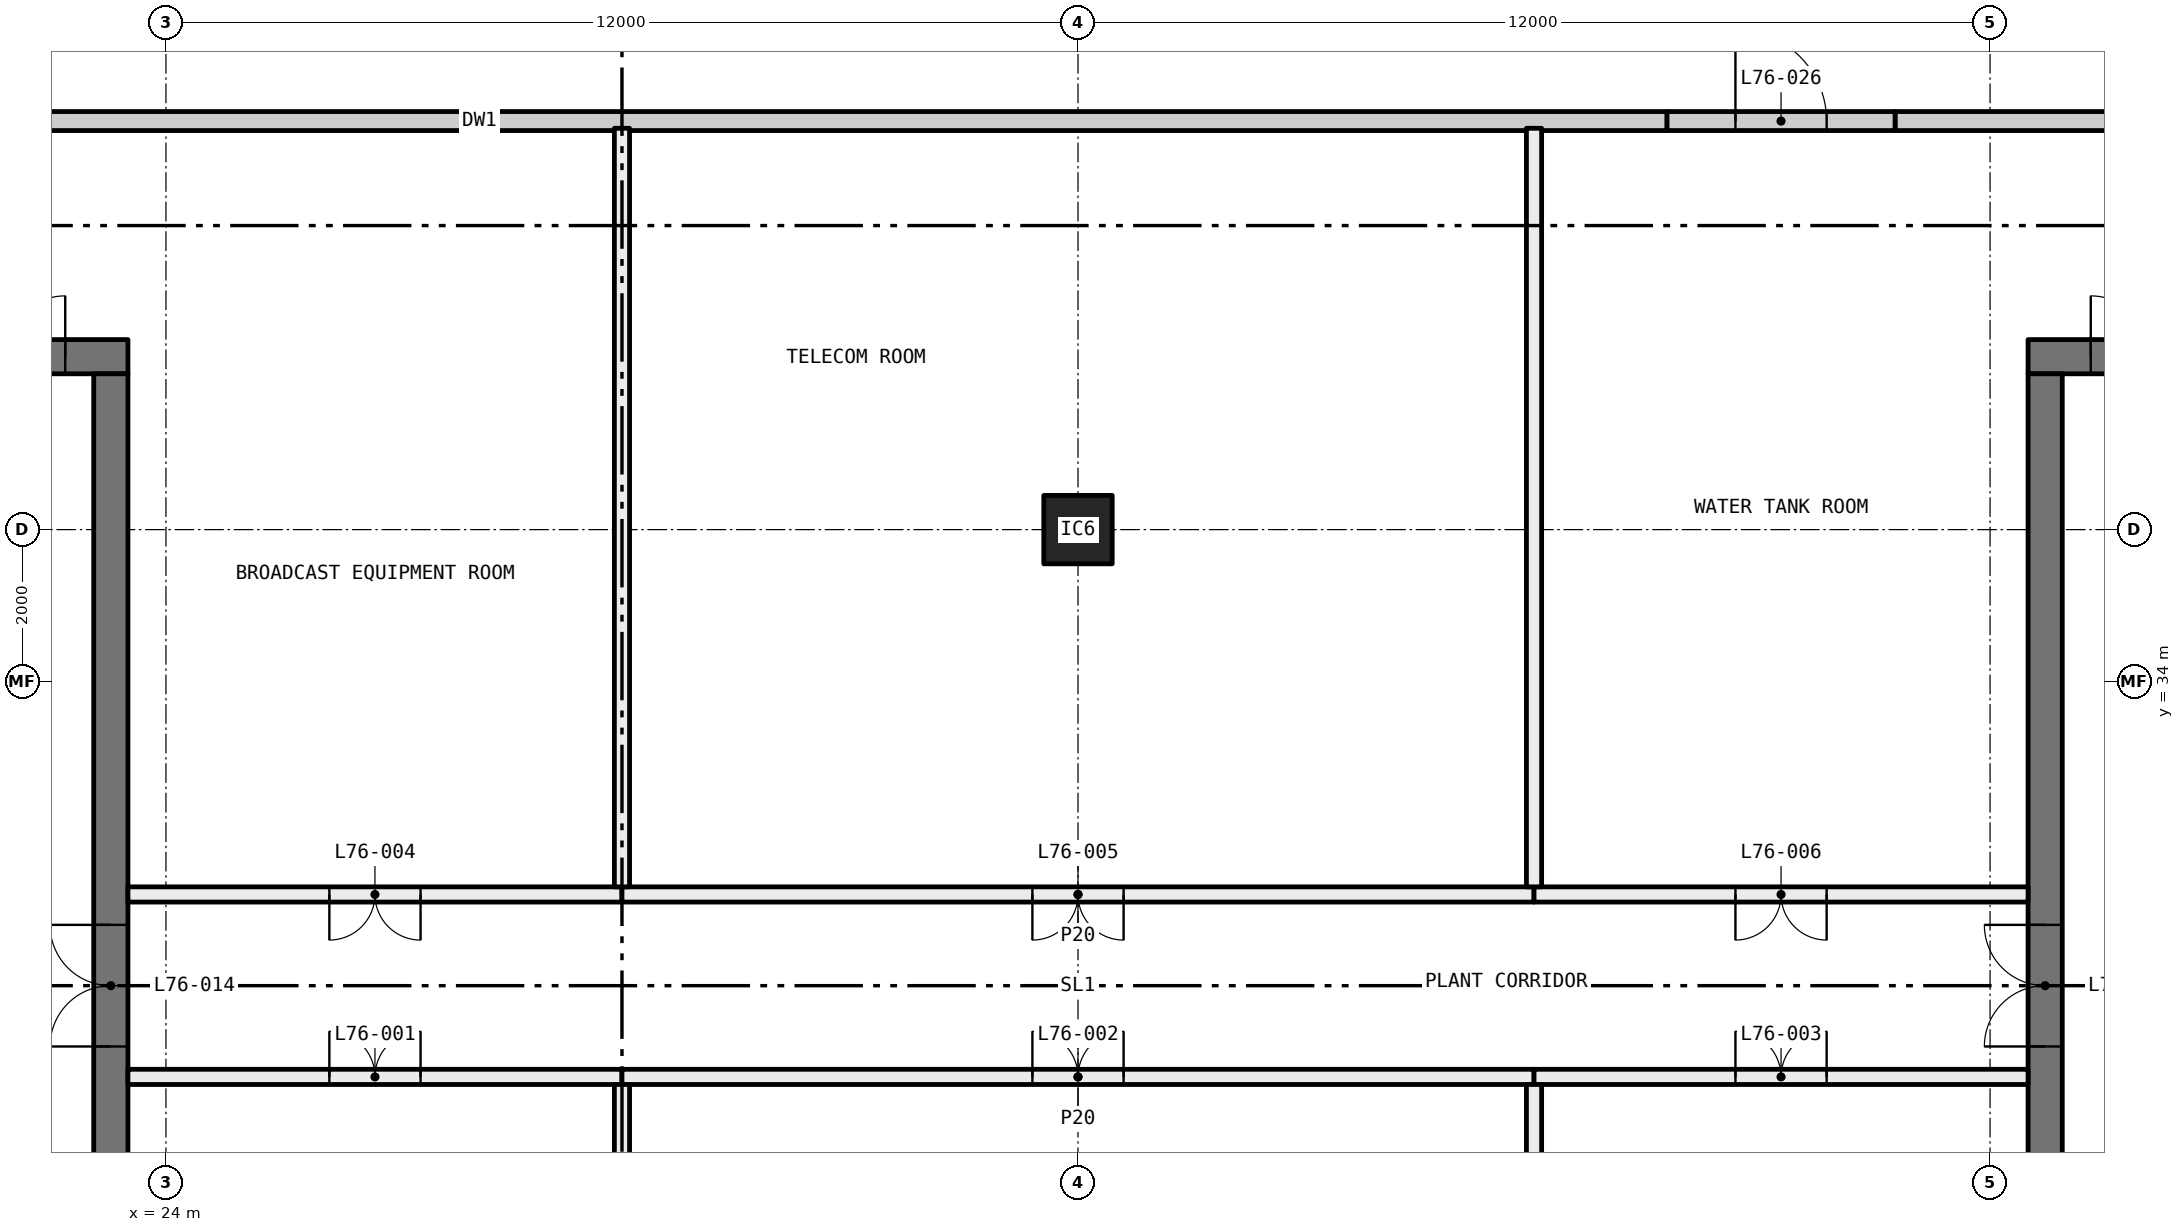
"""IFC4 building model, lengths in metres.
Left out: names, types, materials, properties, quantities, classifications, styles, units other than length and angle.
Written with IfcOpenShell. Run it as: python <this file> out.ifc"""

import sys

from ifc_helpers import new_model, si_unit, direction, frame, frame_2d, origin, origin_2d, place, context, subcontext, project, spatial, rectangle, hollow_rectangle, extrude, element, fill, save


model = new_model("IFC4")
c1 = context("Model", 3, precision=1e-05, world=origin(), true_north=direction((0.0, 1.0)))
c2 = subcontext(c1, "Body", "Model", "MODEL_VIEW")
j1 = project(units=[si_unit("LENGTHUNIT", "METRE"), si_unit("PLANEANGLEUNIT", "RADIAN")], contexts=[c1])
p1 = place(None, origin())
s1 = spatial("IfcSite", under=j1, at=p1, CompositionType="ELEMENT")
p2 = place(p1, origin())
s2 = spatial("IfcBuilding", under=s1, at=p2, CompositionType="ELEMENT")
p3 = place(p2, frame((0.0, 0.0, 283.35)))
s3 = spatial("IfcBuildingStorey", under=s2, at=p3, CompositionType="ELEMENT", Elevation=283.35)
p4 = place(p3, frame((36.0, 36.0, 0.0), z_axis=(0.0, 0.0, 1.0), x_axis=(1.0, 0.0, 0.0)))
e1 = element("IfcColumn", 1, at=p4, inside=s3, PredefinedType="COLUMN", context=c2, shape_type="SweptSolid", body=[
    extrude(hollow_rectangle(XDim=0.9, YDim=0.9, WallThickness=0.03, at=origin_2d()), origin(), (0.0, 0.0, 1.0), 5.6),
])
p5 = place(p3, frame((23.5, 28.8, 0.0), z_axis=(0.0, 0.0, 1.0), x_axis=(1.0, 0.0, 0.0)))
e2 = element("IfcWall", 2, at=p5, inside=s3, PredefinedType="PARTITIONING", context=c2, shape_type="SweptSolid", body=[
    extrude(rectangle(XDim=6.5, YDim=0.2, at=frame_2d((3.25, 0.0))), origin(), (0.0, 0.0, 1.0), 3.6),
])
p6 = place(p5, frame((2.65, 0.0, 0.0)))
e3 = element("IfcOpeningElement", 3, at=p6, cuts=e2, PredefinedType="OPENING", context=c2, shape_type="SweptSolid", body=[
    extrude(rectangle(XDim=1.2, YDim=2.1, at=frame_2d((0.6, 1.05))), frame((0.0, 0.11, 0.0), z_axis=(0.0, -1.0, 0.0), x_axis=(1.0, 0.0, 0.0)), (0.0, 0.0, 1.0), 0.22),
])
p7 = place(p3, frame((30.0, 28.8, 0.0), z_axis=(0.0, 0.0, 1.0), x_axis=(1.0, 0.0, 0.0)))
e4 = element("IfcWall", 4, at=p7, inside=s3, PredefinedType="PARTITIONING", context=c2, shape_type="SweptSolid", body=[
    extrude(rectangle(XDim=12.0, YDim=0.2, at=frame_2d((6.0, 0.0))), origin(), (0.0, 0.0, 1.0), 3.6),
])
p8 = place(p7, frame((5.4, 0.0, 0.0)))
e5 = element("IfcOpeningElement", 5, at=p8, cuts=e4, PredefinedType="OPENING", context=c2, shape_type="SweptSolid", body=[
    extrude(rectangle(XDim=1.2, YDim=2.1, at=frame_2d((0.6, 1.05))), frame((0.0, 0.11, 0.0), z_axis=(0.0, -1.0, 0.0), x_axis=(1.0, 0.0, 0.0)), (0.0, 0.0, 1.0), 0.22),
])
p9 = place(p3, frame((42.0, 28.8, 0.0), z_axis=(0.0, 0.0, 1.0), x_axis=(1.0, 0.0, 0.0)))
e6 = element("IfcWall", 6, at=p9, inside=s3, PredefinedType="PARTITIONING", context=c2, shape_type="SweptSolid", body=[
    extrude(rectangle(XDim=6.5, YDim=0.2, at=frame_2d((3.25, 0.0))), origin(), (0.0, 0.0, 1.0), 3.6),
])
p10 = place(p9, frame((2.65, 0.0, 0.0)))
e7 = element("IfcOpeningElement", 7, at=p10, cuts=e6, PredefinedType="OPENING", context=c2, shape_type="SweptSolid", body=[
    extrude(rectangle(XDim=1.2, YDim=2.1, at=frame_2d((0.6, 1.05))), frame((0.0, 0.11, 0.0), z_axis=(0.0, -1.0, 0.0), x_axis=(1.0, 0.0, 0.0)), (0.0, 0.0, 1.0), 0.22),
])
p11 = place(p3, frame((30.0, 31.2, 0.0), z_axis=(0.0, 0.0, 1.0), x_axis=(-1.0, 0.0, 0.0)))
e8 = element("IfcWall", 8, at=p11, inside=s3, PredefinedType="PARTITIONING", context=c2, shape_type="SweptSolid", body=[
    extrude(rectangle(XDim=6.5, YDim=0.2, at=frame_2d((3.25, 0.0))), origin(), (0.0, 0.0, 1.0), 3.6),
])
p12 = place(p11, frame((2.65, 0.0, 0.0)))
e9 = element("IfcOpeningElement", 9, at=p12, cuts=e8, PredefinedType="OPENING", context=c2, shape_type="SweptSolid", body=[
    extrude(rectangle(XDim=1.2, YDim=2.1, at=frame_2d((0.6, 1.05))), frame((0.0, 0.11, 0.0), z_axis=(0.0, -1.0, 0.0), x_axis=(1.0, 0.0, 0.0)), (0.0, 0.0, 1.0), 0.22),
])
p13 = place(p3, frame((42.0, 31.2, 0.0), z_axis=(0.0, 0.0, 1.0), x_axis=(-1.0, 0.0, 0.0)))
e10 = element("IfcWall", 10, at=p13, inside=s3, PredefinedType="PARTITIONING", context=c2, shape_type="SweptSolid", body=[
    extrude(rectangle(XDim=12.0, YDim=0.2, at=frame_2d((6.0, 0.0))), origin(), (0.0, 0.0, 1.0), 3.6),
])
p14 = place(p13, frame((5.4, 0.0, 0.0)))
e11 = element("IfcOpeningElement", 11, at=p14, cuts=e10, PredefinedType="OPENING", context=c2, shape_type="SweptSolid", body=[
    extrude(rectangle(XDim=1.2, YDim=2.1, at=frame_2d((0.6, 1.05))), frame((0.0, 0.11, 0.0), z_axis=(0.0, -1.0, 0.0), x_axis=(1.0, 0.0, 0.0)), (0.0, 0.0, 1.0), 0.22),
])
p15 = place(p3, frame((48.5, 31.2, 0.0), z_axis=(0.0, 0.0, 1.0), x_axis=(-1.0, 0.0, 0.0)))
e12 = element("IfcWall", 12, at=p15, inside=s3, PredefinedType="PARTITIONING", context=c2, shape_type="SweptSolid", body=[
    extrude(rectangle(XDim=6.5, YDim=0.2, at=frame_2d((3.25, 0.0))), origin(), (0.0, 0.0, 1.0), 3.6),
])
p16 = place(p15, frame((2.65, 0.0, 0.0)))
e13 = element("IfcOpeningElement", 13, at=p16, cuts=e12, PredefinedType="OPENING", context=c2, shape_type="SweptSolid", body=[
    extrude(rectangle(XDim=1.2, YDim=2.1, at=frame_2d((0.6, 1.05))), frame((0.0, 0.11, 0.0), z_axis=(0.0, -1.0, 0.0), x_axis=(1.0, 0.0, 0.0)), (0.0, 0.0, 1.0), 0.22),
])
for number, where, z_axis, x_axis in (
    (14, (30.0, 18.72, 0.0), (0.0, 0.0, 1.0), (0.0, 1.0, 0.0)),
    (15, (42.0, 18.72, 0.0), (0.0, 0.0, 1.0), (0.0, 1.0, 0.0)),
    (16, (30.0, 31.3, 0.0), (0.0, 0.0, 1.0), (0.0, 1.0, 0.0)),
    (17, (42.0, 31.3, 0.0), (0.0, 0.0, 1.0), (0.0, 1.0, 0.0)),
):
    element("IfcWall", number, at=place(p3, frame(where, z_axis=z_axis, x_axis=x_axis)), inside=s3, PredefinedType="PARTITIONING", context=c2, shape_type="SweptSolid", body=[
        extrude(rectangle(XDim=9.98, YDim=0.2, at=frame_2d((4.99, 0.0))), origin(), (0.0, 0.0, 1.0), 5.6),
    ])
p17 = place(p3, frame((12.5, 38.275, 0.0), z_axis=(0.0, 0.0, 1.0), x_axis=(1.0, 0.0, 0.0)))
e18 = element("IfcWall", 18, at=p17, inside=s3, PredefinedType="SHEAR", context=c2, shape_type="SweptSolid", body=[
    extrude(rectangle(XDim=11.0, YDim=0.45, at=frame_2d((5.5, 0.0))), origin(), (0.0, 0.0, 1.0), 5.6),
])
p18 = place(p17, frame((8.575, 0.0, 0.0)))
e19 = element("IfcOpeningElement", 19, at=p18, cuts=e18, PredefinedType="OPENING", context=c2, shape_type="SweptSolid", body=[
    extrude(rectangle(XDim=1.6, YDim=2.1, at=frame_2d((0.8, 1.05))), frame((0.0, 0.235, 0.0), z_axis=(0.0, -1.0, 0.0), x_axis=(1.0, 0.0, 0.0)), (0.0, 0.0, 1.0), 0.47),
])
p19 = place(p3, frame((23.275, 21.95, 0.0), z_axis=(0.0, 0.0, 1.0), x_axis=(0.0, 1.0, 0.0)))
e20 = element("IfcWall", 20, at=p19, inside=s3, PredefinedType="SHEAR", context=c2, shape_type="SweptSolid", body=[
    extrude(rectangle(XDim=16.1, YDim=0.45, at=frame_2d((8.05, 0.0))), origin(), (0.0, 0.0, 1.0), 5.6),
])
p20 = place(p19, frame((7.25, 0.0, 0.0)))
e21 = element("IfcOpeningElement", 21, at=p20, cuts=e20, PredefinedType="OPENING", context=c2, shape_type="SweptSolid", body=[
    extrude(rectangle(XDim=1.6, YDim=2.1, at=frame_2d((0.8, 1.05))), frame((0.0, 0.235, 0.0), z_axis=(0.0, -1.0, 0.0), x_axis=(1.0, 0.0, 0.0)), (0.0, 0.0, 1.0), 0.47),
])
p21 = place(p3, frame((59.5, 38.275, 0.0), z_axis=(0.0, 0.0, 1.0), x_axis=(-1.0, 0.0, 0.0)))
e22 = element("IfcWall", 22, at=p21, inside=s3, PredefinedType="SHEAR", context=c2, shape_type="SweptSolid", body=[
    extrude(rectangle(XDim=11.0, YDim=0.45, at=frame_2d((5.5, 0.0))), origin(), (0.0, 0.0, 1.0), 5.6),
])
p22 = place(p21, frame((8.575, 0.0, 0.0)))
e23 = element("IfcOpeningElement", 23, at=p22, cuts=e22, PredefinedType="OPENING", context=c2, shape_type="SweptSolid", body=[
    extrude(rectangle(XDim=1.6, YDim=2.1, at=frame_2d((0.8, 1.05))), frame((0.0, 0.235, 0.0), z_axis=(0.0, -1.0, 0.0), x_axis=(1.0, 0.0, 0.0)), (0.0, 0.0, 1.0), 0.47),
])
p23 = place(p3, frame((48.725, 21.95, 0.0), z_axis=(0.0, 0.0, 1.0), x_axis=(0.0, 1.0, 0.0)))
e24 = element("IfcWall", 24, at=p23, inside=s3, PredefinedType="SHEAR", context=c2, shape_type="SweptSolid", body=[
    extrude(rectangle(XDim=16.1, YDim=0.45, at=frame_2d((8.05, 0.0))), origin(), (0.0, 0.0, 1.0), 5.6),
])
p24 = place(p23, frame((7.25, 0.0, 0.0)))
e25 = element("IfcOpeningElement", 25, at=p24, cuts=e24, PredefinedType="OPENING", context=c2, shape_type="SweptSolid", body=[
    extrude(rectangle(XDim=1.6, YDim=2.1, at=frame_2d((0.8, 1.05))), frame((0.0, 0.235, 0.0), z_axis=(0.0, -1.0, 0.0), x_axis=(1.0, 0.0, 0.0)), (0.0, 0.0, 1.0), 0.47),
])
p25 = place(p3, frame((12.5, 41.375, 0.0), z_axis=(0.0, 0.0, 1.0), x_axis=(1.0, 0.0, 0.0)))
e26 = element("IfcWall", 26, at=p25, inside=s3, PredefinedType="SOLIDWALL", context=c2, shape_type="SweptSolid", body=[
    extrude(rectangle(XDim=31.25, YDim=0.25, at=frame_2d((15.625, 0.0))), origin(), (0.0, 0.0, 1.0), 1.2),
])
p26 = place(p3, frame((46.75, 41.375, 0.0), z_axis=(0.0, 0.0, 1.0), x_axis=(1.0, 0.0, 0.0)))
e27 = element("IfcWall", 27, at=p26, inside=s3, PredefinedType="SOLIDWALL", context=c2, shape_type="SweptSolid", body=[
    extrude(rectangle(XDim=12.75, YDim=0.25, at=frame_2d((6.375, 0.0))), origin(), (0.0, 0.0, 1.0), 1.2),
])
p27 = place(p3, frame((43.75, 41.375, 0.0), z_axis=(0.0, 0.0, 1.0), x_axis=(1.0, 0.0, 0.0)))
e28 = element("IfcWall", 28, at=p27, inside=s3, PredefinedType="SOLIDWALL", context=c2, shape_type="SweptSolid", body=[
    extrude(rectangle(XDim=3.0, YDim=0.25, at=frame_2d((1.5, 0.0))), origin(), (0.0, 0.0, 1.0), 5.6),
])
p28 = place(p27, frame((0.9, 0.0, 0.0)))
e29 = element("IfcOpeningElement", 29, at=p28, cuts=e28, PredefinedType="OPENING", context=c2, shape_type="SweptSolid", body=[
    extrude(rectangle(XDim=1.2, YDim=2.1, at=frame_2d((0.6, 1.05))), frame((0.0, 0.135, 0.0), z_axis=(0.0, -1.0, 0.0), x_axis=(1.0, 0.0, 0.0)), (0.0, 0.0, 1.0), 0.27),
])
p29 = place(p6, origin())
e30 = element("IfcDoor", 30, at=p29, inside=s3, OperationType="DOUBLE_DOOR_SINGLE_SWING", PredefinedType="DOOR", context=c2, shape_type="SweptSolid", body=[
    extrude(rectangle(XDim=1.2, YDim=2.1, at=frame_2d((0.6, 1.05))), frame((0.0, 0.025, 0.0), z_axis=(0.0, -1.0, 0.0), x_axis=(1.0, 0.0, 0.0)), (0.0, 0.0, 1.0), 0.05),
])
fill(e3, e30)
p30 = place(p8, origin())
e31 = element("IfcDoor", 31, at=p30, inside=s3, OperationType="DOUBLE_DOOR_SINGLE_SWING", PredefinedType="DOOR", context=c2, shape_type="SweptSolid", body=[
    extrude(rectangle(XDim=1.2, YDim=2.1, at=frame_2d((0.6, 1.05))), frame((0.0, 0.025, 0.0), z_axis=(0.0, -1.0, 0.0), x_axis=(1.0, 0.0, 0.0)), (0.0, 0.0, 1.0), 0.05),
])
fill(e5, e31)
p31 = place(p10, origin())
e32 = element("IfcDoor", 32, at=p31, inside=s3, OperationType="DOUBLE_DOOR_SINGLE_SWING", PredefinedType="DOOR", context=c2, shape_type="SweptSolid", body=[
    extrude(rectangle(XDim=1.2, YDim=2.1, at=frame_2d((0.6, 1.05))), frame((0.0, 0.025, 0.0), z_axis=(0.0, -1.0, 0.0), x_axis=(1.0, 0.0, 0.0)), (0.0, 0.0, 1.0), 0.05),
])
fill(e7, e32)
p32 = place(p12, origin())
e33 = element("IfcDoor", 33, at=p32, inside=s3, OperationType="DOUBLE_DOOR_SINGLE_SWING", PredefinedType="DOOR", context=c2, shape_type="SweptSolid", body=[
    extrude(rectangle(XDim=1.2, YDim=2.1, at=frame_2d((0.6, 1.05))), frame((0.0, 0.025, 0.0), z_axis=(0.0, -1.0, 0.0), x_axis=(1.0, 0.0, 0.0)), (0.0, 0.0, 1.0), 0.05),
])
fill(e9, e33)
p33 = place(p14, origin())
e34 = element("IfcDoor", 34, at=p33, inside=s3, OperationType="DOUBLE_DOOR_SINGLE_SWING", PredefinedType="DOOR", context=c2, shape_type="SweptSolid", body=[
    extrude(rectangle(XDim=1.2, YDim=2.1, at=frame_2d((0.6, 1.05))), frame((0.0, 0.025, 0.0), z_axis=(0.0, -1.0, 0.0), x_axis=(1.0, 0.0, 0.0)), (0.0, 0.0, 1.0), 0.05),
])
fill(e11, e34)
p34 = place(p16, origin())
e35 = element("IfcDoor", 35, at=p34, inside=s3, OperationType="DOUBLE_DOOR_SINGLE_SWING", PredefinedType="DOOR", context=c2, shape_type="SweptSolid", body=[
    extrude(rectangle(XDim=1.2, YDim=2.1, at=frame_2d((0.6, 1.05))), frame((0.0, 0.025, 0.0), z_axis=(0.0, -1.0, 0.0), x_axis=(1.0, 0.0, 0.0)), (0.0, 0.0, 1.0), 0.05),
])
fill(e13, e35)
p35 = place(p18, origin())
e36 = element("IfcDoor", 36, at=p35, inside=s3, OperationType="DOUBLE_DOOR_SINGLE_SWING", PredefinedType="DOOR", context=c2, shape_type="SweptSolid", body=[
    extrude(rectangle(XDim=1.6, YDim=2.1, at=frame_2d((0.8, 1.05))), frame((0.0, 0.025, 0.0), z_axis=(0.0, -1.0, 0.0), x_axis=(1.0, 0.0, 0.0)), (0.0, 0.0, 1.0), 0.05),
])
fill(e19, e36)
p36 = place(p20, origin())
e37 = element("IfcDoor", 37, at=p36, inside=s3, OperationType="DOUBLE_DOOR_SINGLE_SWING", PredefinedType="DOOR", context=c2, shape_type="SweptSolid", body=[
    extrude(rectangle(XDim=1.6, YDim=2.1, at=frame_2d((0.8, 1.05))), frame((0.0, 0.025, 0.0), z_axis=(0.0, -1.0, 0.0), x_axis=(1.0, 0.0, 0.0)), (0.0, 0.0, 1.0), 0.05),
])
fill(e21, e37)
p37 = place(p22, frame((1.6, 0.0, 0.0), x_axis=(-1.0, 0.0, 0.0)))
e38 = element("IfcDoor", 38, at=p37, inside=s3, OperationType="DOUBLE_DOOR_SINGLE_SWING", PredefinedType="DOOR", context=c2, shape_type="SweptSolid", body=[
    extrude(rectangle(XDim=1.6, YDim=2.1, at=frame_2d((0.8, 1.05))), frame((0.0, 0.025, 0.0), z_axis=(0.0, -1.0, 0.0), x_axis=(1.0, 0.0, 0.0)), (0.0, 0.0, 1.0), 0.05),
])
fill(e23, e38)
p38 = place(p24, origin())
e39 = element("IfcDoor", 39, at=p38, inside=s3, OperationType="DOUBLE_DOOR_SINGLE_SWING", PredefinedType="DOOR", context=c2, shape_type="SweptSolid", body=[
    extrude(rectangle(XDim=1.6, YDim=2.1, at=frame_2d((0.8, 1.05))), frame((0.0, 0.025, 0.0), z_axis=(0.0, -1.0, 0.0), x_axis=(1.0, 0.0, 0.0)), (0.0, 0.0, 1.0), 0.05),
])
fill(e25, e39)
p39 = place(p28, origin())
e40 = element("IfcDoor", 40, at=p39, inside=s3, OperationType="SINGLE_SWING_RIGHT", PredefinedType="DOOR", context=c2, shape_type="SweptSolid", body=[
    extrude(rectangle(XDim=1.2, YDim=2.1, at=frame_2d((0.6, 1.05))), frame((0.0, 0.025, 0.0), z_axis=(0.0, -1.0, 0.0), x_axis=(1.0, 0.0, 0.0)), (0.0, 0.0, 1.0), 0.05),
])
fill(e29, e40)
save(model, sys.argv[1])
